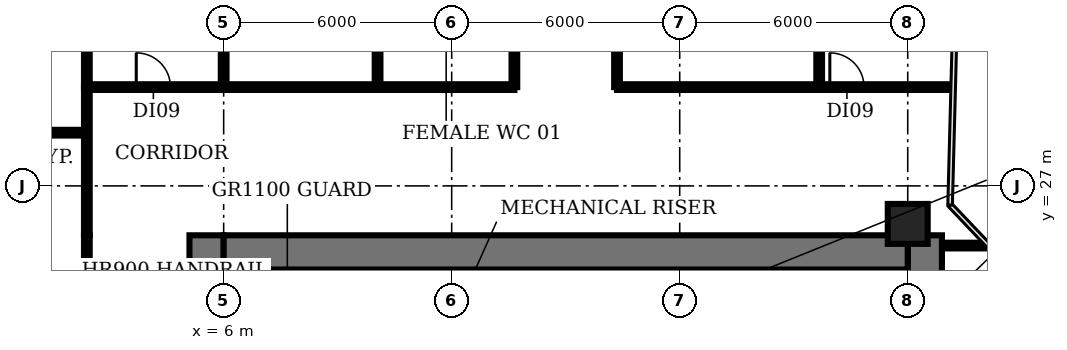
"""IFC4 building model, lengths in metres.
Left out: names, types, materials, properties, quantities, classifications, styles, units other than length and angle.
Written with IfcOpenShell. Run it as: python <this file> out.ifc"""

import sys

from ifc_helpers import new_model, si_unit, direction, frame, frame_2d, origin, origin_2d, place, context, subcontext, project, spatial, rectangle, circle, extrude, element, fill, save


model = new_model("IFC4")
c1 = context("Model", 3, precision=1e-05, world=origin(), true_north=direction((0.0, 1.0)))
c2 = subcontext(c1, "Body", "Model", "MODEL_VIEW")
j1 = project(units=[si_unit("LENGTHUNIT", "METRE"), si_unit("PLANEANGLEUNIT", "RADIAN")], contexts=[c1])
p1 = place(None, origin())
s1 = spatial("IfcSite", under=j1, at=p1, CompositionType="ELEMENT")
p2 = place(p1, origin())
s2 = spatial("IfcBuilding", under=s1, at=p2, CompositionType="ELEMENT")
p3 = place(p2, frame((0.0, 0.0, 45.8)))
s3 = spatial("IfcBuildingStorey", under=s2, at=p3, CompositionType="ELEMENT", Elevation=45.8)
p4 = place(p3, frame((24.0, 26.0, 0.0), z_axis=(0.0, 0.0, 1.0), x_axis=(1.0, 0.0, 0.0)))
e1 = element("IfcColumn", 1, at=p4, inside=s3, PredefinedType="COLUMN", context=c2, shape_type="SweptSolid", body=[
    extrude(circle(Radius=0.525, at=origin_2d()), origin(), (0.0, 0.0, 1.0), 3.85),
])
p5 = place(p3, frame((9.275, 18.375, 0.0), z_axis=(0.0, 0.0, 1.0), x_axis=(0.0, 1.0, 0.0)))
e2 = element("IfcWall", 2, at=p5, inside=s3, PredefinedType="SHEAR", context=c2, shape_type="SweptSolid", body=[
    extrude(rectangle(XDim=6.425, YDim=0.25, at=frame_2d((3.212, 0.0))), origin(), (0.0, 0.0, 1.0), 3.85),
])
for number, where, z_axis, x_axis in (
    (3, (15.1, 22.9, 0.0), (0.0, 0.0, 1.0), (0.0, 1.0, 0.0)),
    (4, (20.7, 22.9, 0.0), (0.0, 0.0, 1.0), (0.0, 1.0, 0.0)),
):
    element("IfcWall", number, at=place(p3, frame(where, z_axis=z_axis, x_axis=x_axis)), inside=s3, PredefinedType="SHEAR", context=c2, shape_type="SweptSolid", body=[
        extrude(rectangle(XDim=1.9, YDim=0.2, at=frame_2d((0.95, 0.0))), origin(), (0.0, 0.0, 1.0), 3.85),
    ])
p6 = place(p3, frame((5.55, 4.5, 0.0), z_axis=(0.0, 0.0, 1.0), x_axis=(0.0, 1.0, 0.0)))
e5 = element("IfcWall", 5, at=p6, inside=s3, PredefinedType="SHEAR", context=c2, shape_type="SweptSolid", body=[
    extrude(rectangle(XDim=21.2, YDim=0.9, at=frame_2d((10.6, 0.0))), origin(), (0.0, 0.0, 1.0), 3.85),
])
p7 = place(p6, frame((1.15, 0.0, 0.0)))
e6 = element("IfcOpeningElement", 6, at=p7, cuts=e5, PredefinedType="OPENING", context=c2, shape_type="SweptSolid", body=[
    extrude(rectangle(XDim=1.5, YDim=2.1, at=frame_2d((0.75, 1.05))), frame((0.0, 0.46, 0.0), z_axis=(0.0, -1.0, 0.0), x_axis=(1.0, 0.0, 0.0)), (0.0, 0.0, 1.0), 0.92),
])
p8 = place(p6, frame((7.6, 0.0, 0.0)))
e7 = element("IfcOpeningElement", 7, at=p8, cuts=e5, PredefinedType="OPENING", context=c2, shape_type="SweptSolid", body=[
    extrude(rectangle(XDim=1.2, YDim=2.1, at=frame_2d((0.6, 1.05))), frame((0.0, 0.46, 0.0), z_axis=(0.0, -1.0, 0.0), x_axis=(1.0, 0.0, 0.0)), (0.0, 0.0, 1.0), 0.92),
])
p9 = place(p6, frame((14.15, 0.0, 0.0)))
e8 = element("IfcOpeningElement", 8, at=p9, cuts=e5, PredefinedType="OPENING", context=c2, shape_type="SweptSolid", body=[
    extrude(rectangle(XDim=1.2, YDim=2.1, at=frame_2d((0.6, 1.05))), frame((0.0, 0.46, 0.0), z_axis=(0.0, -1.0, 0.0), x_axis=(1.0, 0.0, 0.0)), (0.0, 0.0, 1.0), 0.92),
])
p10 = place(p3, frame((24.45, 25.7, 0.0), z_axis=(0.0, 0.0, 1.0), x_axis=(0.0, -1.0, 0.0)))
e9 = element("IfcWall", 9, at=p10, inside=s3, PredefinedType="SHEAR", context=c2, shape_type="SweptSolid", body=[
    extrude(rectangle(XDim=21.2, YDim=0.9, at=frame_2d((10.6, 0.0))), origin(), (0.0, 0.0, 1.0), 3.85),
])
p11 = place(p10, frame((18.55, 0.0, 0.0)))
e10 = element("IfcOpeningElement", 10, at=p11, cuts=e9, PredefinedType="OPENING", context=c2, shape_type="SweptSolid", body=[
    extrude(rectangle(XDim=1.5, YDim=2.1, at=frame_2d((0.75, 1.05))), frame((0.0, 0.46, 0.0), z_axis=(0.0, -1.0, 0.0), x_axis=(1.0, 0.0, 0.0)), (0.0, 0.0, 1.0), 0.92),
])
p12 = place(p10, frame((12.45, 0.0, 0.0)))
e11 = element("IfcOpeningElement", 11, at=p12, cuts=e9, PredefinedType="OPENING", context=c2, shape_type="SweptSolid", body=[
    extrude(rectangle(XDim=0.9, YDim=2.1, at=frame_2d((0.45, 1.05))), frame((0.0, 0.46, 0.0), z_axis=(0.0, -1.0, 0.0), x_axis=(1.0, 0.0, 0.0)), (0.0, 0.0, 1.0), 0.92),
])
p13 = place(p10, frame((6.45, 0.0, 0.0)))
e12 = element("IfcOpeningElement", 12, at=p13, cuts=e9, PredefinedType="OPENING", context=c2, shape_type="SweptSolid", body=[
    extrude(rectangle(XDim=2.0, YDim=2.1, at=frame_2d((1.0, 1.05))), frame((0.0, 0.46, 0.0), z_axis=(0.0, -1.0, 0.0), x_axis=(1.0, 0.0, 0.0)), (0.0, 0.0, 1.0), 0.92),
])
p14 = place(p3, frame((6.0, 25.25, 0.0), z_axis=(0.0, 0.0, 1.0), x_axis=(1.0, 0.0, 0.0)))
e13 = element("IfcWall", 13, at=p14, inside=s3, PredefinedType="SHEAR", context=c2, shape_type="SweptSolid", body=[
    extrude(rectangle(XDim=18.0, YDim=0.9, at=frame_2d((9.0, 0.0))), origin(), (0.0, 0.0, 1.0), 3.85),
])
p15 = place(p3, frame((-1.01, 28.4, 0.0), z_axis=(0.0, 0.0, 1.0), x_axis=(1.0, 0.0, 0.0)))
e14 = element("IfcWall", 14, at=p15, inside=s3, PredefinedType="PARTITIONING", context=c2, shape_type="SweptSolid", body=[
    extrude(rectangle(XDim=3.41, YDim=0.15, at=frame_2d((1.705, 0.0))), origin(), (0.0, 0.0, 1.0), 2.83),
])
p16 = place(p3, frame((2.4, 4.5, 0.0), z_axis=(0.0, 0.0, 1.0), x_axis=(0.0, 1.0, 0.0)))
e15 = element("IfcWall", 15, at=p16, inside=s3, PredefinedType="PARTITIONING", context=c2, shape_type="SweptSolid", body=[
    extrude(rectangle(XDim=21.2, YDim=0.15, at=frame_2d((10.6, 0.0))), origin(), (0.0, 0.0, 1.0), 2.83),
])
p17 = place(p16, frame((10.8, 0.0, 0.0)))
e16 = element("IfcOpeningElement", 16, at=p17, cuts=e15, PredefinedType="OPENING", context=c2, shape_type="SweptSolid", body=[
    extrude(rectangle(XDim=1.2, YDim=2.1, at=frame_2d((0.6, 1.05))), frame((0.0, 0.085, 0.0), z_axis=(0.0, -1.0, 0.0), x_axis=(1.0, 0.0, 0.0)), (0.0, 0.0, 1.0), 0.17),
])
p18 = place(p3, frame((2.4, 25.7, 0.0), z_axis=(0.0, 0.0, 1.0), x_axis=(0.0, 1.0, 0.0)))
e17 = element("IfcWall", 17, at=p18, inside=s3, PredefinedType="PARTITIONING", context=c2, shape_type="SweptSolid", body=[
    extrude(rectangle(XDim=3.9, YDim=0.15, at=frame_2d((1.95, 0.0))), origin(), (0.0, 0.0, 1.0), 2.83),
])
p19 = place(p3, frame((2.4, 29.6, 0.0), z_axis=(0.0, 0.0, 1.0), x_axis=(0.0, 1.0, 0.0)))
e18 = element("IfcWall", 18, at=p19, inside=s3, PredefinedType="PARTITIONING", context=c2, shape_type="SweptSolid", body=[
    extrude(rectangle(XDim=4.8, YDim=0.15, at=frame_2d((2.4, 0.0))), origin(), (0.0, 0.0, 1.0), 2.83),
])
p20 = place(p3, frame((2.4, 29.6, 0.0), z_axis=(0.0, 0.0, 1.0), x_axis=(1.0, 0.0, 0.0)))
e19 = element("IfcWall", 19, at=p20, inside=s3, PredefinedType="PARTITIONING", context=c2, shape_type="SweptSolid", body=[
    extrude(rectangle(XDim=3.6, YDim=0.15, at=frame_2d((1.8, 0.0))), origin(), (0.0, 0.0, 1.0), 2.83),
])
p21 = place(p20, frame((1.3, 0.0, 0.0)))
e20 = element("IfcOpeningElement", 20, at=p21, cuts=e19, PredefinedType="OPENING", context=c2, shape_type="SweptSolid", body=[
    extrude(rectangle(XDim=0.9, YDim=2.1, at=frame_2d((0.45, 1.05))), frame((0.0, 0.085, 0.0), z_axis=(0.0, -1.0, 0.0), x_axis=(1.0, 0.0, 0.0)), (0.0, 0.0, 1.0), 0.17),
])
p22 = place(p3, frame((6.0, 29.6, 0.0), z_axis=(0.0, 0.0, 1.0), x_axis=(0.0, 1.0, 0.0)))
e21 = element("IfcWall", 21, at=p22, inside=s3, PredefinedType="PARTITIONING", context=c2, shape_type="SweptSolid", body=[
    extrude(rectangle(XDim=4.8, YDim=0.15, at=frame_2d((2.4, 0.0))), origin(), (0.0, 0.0, 1.0), 2.83),
])
p23 = place(p3, frame((6.0, 29.6, 0.0), z_axis=(0.0, 0.0, 1.0), x_axis=(1.0, 0.0, 0.0)))
e22 = element("IfcWall", 22, at=p23, inside=s3, PredefinedType="PARTITIONING", context=c2, shape_type="SweptSolid", body=[
    extrude(rectangle(XDim=7.65, YDim=0.15, at=frame_2d((3.825, 0.0))), origin(), (0.0, 0.0, 1.0), 2.83),
])
p24 = place(p3, frame((10.05, 29.6, 0.0), z_axis=(0.0, 0.0, 1.0), x_axis=(0.0, 1.0, 0.0)))
e23 = element("IfcWall", 23, at=p24, inside=s3, PredefinedType="PARTITIONING", context=c2, shape_type="SweptSolid", body=[
    extrude(rectangle(XDim=4.8, YDim=0.15, at=frame_2d((2.4, 0.0))), origin(), (0.0, 0.0, 1.0), 2.83),
])
p25 = place(p3, frame((13.65, 29.6, 0.0), z_axis=(0.0, 0.0, 1.0), x_axis=(0.0, 1.0, 0.0)))
e24 = element("IfcWall", 24, at=p25, inside=s3, PredefinedType="PARTITIONING", context=c2, shape_type="SweptSolid", body=[
    extrude(rectangle(XDim=4.8, YDim=0.15, at=frame_2d((2.4, 0.0))), origin(), (0.0, 0.0, 1.0), 2.83),
])
p26 = place(p25, frame((1.9, 0.0, 0.0)))
e25 = element("IfcOpeningElement", 25, at=p26, cuts=e24, PredefinedType="OPENING", context=c2, shape_type="SweptSolid", body=[
    extrude(rectangle(XDim=0.9, YDim=2.1, at=frame_2d((0.45, 1.05))), frame((0.0, 0.085, 0.0), z_axis=(0.0, -1.0, 0.0), x_axis=(1.0, 0.0, 0.0)), (0.0, 0.0, 1.0), 0.17),
])
p27 = place(p3, frame((16.35, 29.6, 0.0), z_axis=(0.0, 0.0, 1.0), x_axis=(0.0, 1.0, 0.0)))
e26 = element("IfcWall", 26, at=p27, inside=s3, PredefinedType="PARTITIONING", context=c2, shape_type="SweptSolid", body=[
    extrude(rectangle(XDim=4.8, YDim=0.15, at=frame_2d((2.4, 0.0))), origin(), (0.0, 0.0, 1.0), 2.83),
])
p28 = place(p3, frame((16.35, 29.6, 0.0), z_axis=(0.0, 0.0, 1.0), x_axis=(1.0, 0.0, 0.0)))
e27 = element("IfcWall", 27, at=p28, inside=s3, PredefinedType="PARTITIONING", context=c2, shape_type="SweptSolid", body=[
    extrude(rectangle(XDim=5.32, YDim=0.15, at=frame_2d((2.66, 0.0))), origin(), (0.0, 0.0, 1.0), 2.83),
])
p29 = place(p3, frame((21.67, 29.6, 0.0), z_axis=(0.0, 0.0, 1.0), x_axis=(0.0, 1.0, 0.0)))
e28 = element("IfcWall", 28, at=p29, inside=s3, PredefinedType="PARTITIONING", context=c2, shape_type="SweptSolid", body=[
    extrude(rectangle(XDim=4.8, YDim=0.15, at=frame_2d((2.4, 0.0))), origin(), (0.0, 0.0, 1.0), 2.83),
])
p30 = place(p3, frame((21.67, 29.6, 0.0), z_axis=(0.0, 0.0, 1.0), x_axis=(1.0, 0.0, 0.0)))
e29 = element("IfcWall", 29, at=p30, inside=s3, PredefinedType="PARTITIONING", context=c2, shape_type="SweptSolid", body=[
    extrude(rectangle(XDim=3.48, YDim=0.15, at=frame_2d((1.74, 0.0))), origin(), (0.0, 0.0, 1.0), 2.83),
])
p31 = place(p30, frame((0.28, 0.0, 0.0)))
e30 = element("IfcOpeningElement", 30, at=p31, cuts=e29, PredefinedType="OPENING", context=c2, shape_type="SweptSolid", body=[
    extrude(rectangle(XDim=0.9, YDim=2.1, at=frame_2d((0.45, 1.05))), frame((0.0, 0.085, 0.0), z_axis=(0.0, -1.0, 0.0), x_axis=(1.0, 0.0, 0.0)), (0.0, 0.0, 1.0), 0.17),
])
p32 = place(p3, frame((25.0, 25.43, 0.0), z_axis=(0.0, 0.0, 1.0), x_axis=(1.0, 0.0, 0.0)))
e31 = element("IfcWall", 31, at=p32, inside=s3, PredefinedType="PARTITIONING", context=c2, shape_type="SweptSolid", body=[
    extrude(rectangle(XDim=1.06, YDim=0.15, at=frame_2d((0.53, 0.0))), origin(), (0.0, 0.0, 1.0), 2.83),
])
p33 = place(p21, origin())
e32 = element("IfcDoor", 32, at=p33, inside=s3, OperationType="SINGLE_SWING_LEFT", PredefinedType="DOOR", context=c2, shape_type="SweptSolid", body=[
    extrude(rectangle(XDim=0.9, YDim=2.1, at=frame_2d((0.45, 1.05))), frame((0.0, 0.025, 0.0), z_axis=(0.0, -1.0, 0.0), x_axis=(1.0, 0.0, 0.0)), (0.0, 0.0, 1.0), 0.05),
])
fill(e20, e32)
p34 = place(p31, origin())
e33 = element("IfcDoor", 33, at=p34, inside=s3, OperationType="SINGLE_SWING_LEFT", PredefinedType="DOOR", context=c2, shape_type="SweptSolid", body=[
    extrude(rectangle(XDim=0.9, YDim=2.1, at=frame_2d((0.45, 1.05))), frame((0.0, 0.025, 0.0), z_axis=(0.0, -1.0, 0.0), x_axis=(1.0, 0.0, 0.0)), (0.0, 0.0, 1.0), 0.05),
])
fill(e30, e33)
save(model, sys.argv[1])
